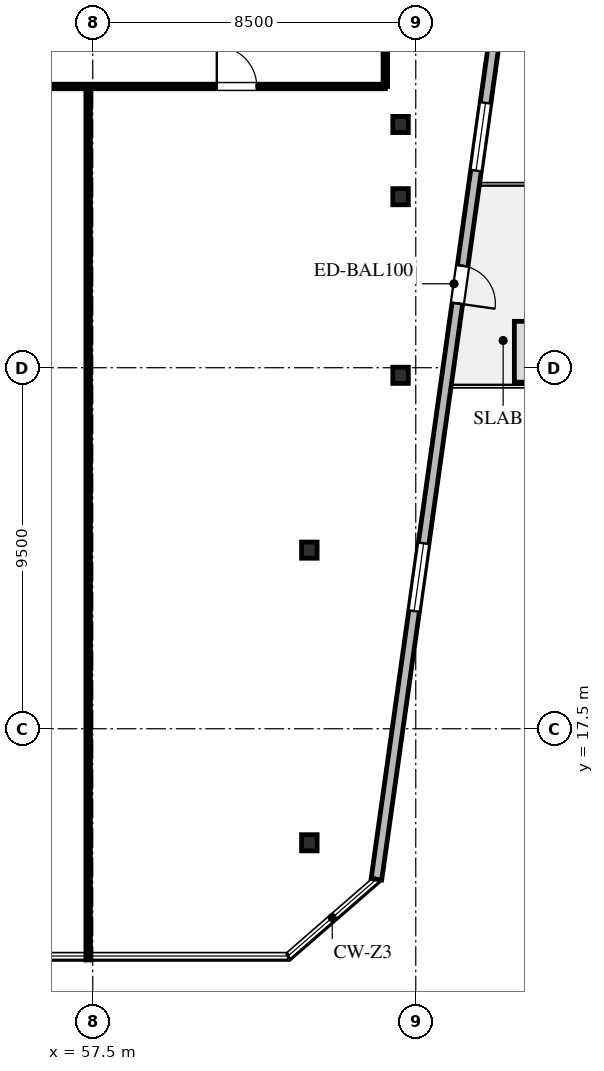
"""IFC4 building model, lengths in metres.
Left out: names, types, materials, properties, quantities, classifications, styles, units other than length and angle.
Written with IfcOpenShell. Run it as: python <this file> out.ifc"""

import sys

from ifc_helpers import new_model, si_unit, direction, frame, frame_2d, origin, origin_2d, place, context, subcontext, project, spatial, rectangle, i_section, extrude, element, fill, save


model = new_model("IFC4")
c1 = context("Model", 3, precision=1e-05, world=origin(), true_north=direction((0.0, 1.0)))
c2 = subcontext(c1, "Body", "Model", "MODEL_VIEW")
j1 = project(units=[si_unit("LENGTHUNIT", "METRE"), si_unit("PLANEANGLEUNIT", "RADIAN")], contexts=[c1])
p1 = place(None, origin())
s1 = spatial("IfcSite", under=j1, at=p1, CompositionType="ELEMENT")
p2 = place(p1, origin())
s2 = spatial("IfcBuilding", under=s1, at=p2, CompositionType="ELEMENT")
p3 = place(p2, frame((0.0, 0.0, 192.5)))
s3 = spatial("IfcBuildingStorey", under=s2, at=p3, CompositionType="ELEMENT", Elevation=192.5)
for number, where, z_axis, x_axis in (
    (1, (65.6, 26.8, 0.0), (0.0, 0.0, 1.0), (1.0, 0.0, 0.0)),
    (2, (65.6, 31.5, 0.0), (0.0, 0.0, 1.0), (1.0, 0.0, 0.0)),
    (3, (63.2, 14.5, 0.0), (0.0, 0.0, 1.0), (1.0, 0.0, 0.0)),
    (4, (63.2, 22.2, 0.0), (0.0, 0.0, 1.0), (1.0, 0.0, 0.0)),
    (5, (65.6, 33.4, 0.0), (0.0, 0.0, 1.0), (1.0, 0.0, 0.0)),
):
    element("IfcColumn", number, at=place(p3, frame(where, z_axis=z_axis, x_axis=x_axis)), inside=s3, PredefinedType="COLUMN", context=c2, shape_type="SweptSolid", body=[
        extrude(i_section(OverallWidth=0.409, OverallDepth=0.425, WebThickness=0.033, FlangeThickness=0.052, FilletRadius=0.03, at=origin_2d()), origin(), (0.0, 0.0, 1.0), 4.0),
    ])
p4 = place(p3, frame((68.375, 37.8, 0.0), z_axis=(0.0, 0.0, 1.0), x_axis=(-0.139173290738, -0.99026804207, 0.0)))
e6 = element("IfcWall", 6, at=p4, inside=s3, PredefinedType="STANDARD", context=c2, shape_type="SweptSolid", body=[
    extrude(rectangle(XDim=24.498, YDim=0.28, at=frame_2d((12.249, 0.0))), origin(), (0.0, 0.0, 1.0), 3.755),
])
p5 = place(p4, frame((8.198, 0.0, 0.0)))
e7 = element("IfcOpeningElement", 7, at=p5, cuts=e6, PredefinedType="OPENING", context=c2, shape_type="SweptSolid", body=[
    extrude(rectangle(XDim=1.0, YDim=2.15, at=frame_2d((0.5, 1.075))), frame((0.0, 0.15, 0.0), z_axis=(0.0, -1.0, 0.0), x_axis=(1.0, 0.0, 0.0)), (0.0, 0.0, 1.0), 0.3),
])
p6 = place(p4, frame((3.869, 0.0, 0.65)))
e8 = element("IfcOpeningElement", 8, at=p6, cuts=e6, PredefinedType="OPENING", context=c2, shape_type="SweptSolid", body=[
    extrude(rectangle(XDim=1.8, YDim=2.1, at=frame_2d((0.9, 1.05))), frame((0.0, 0.15, 0.0), z_axis=(0.0, -1.0, 0.0), x_axis=(1.0, 0.0, 0.0)), (0.0, 0.0, 1.0), 0.3),
])
p7 = place(p4, frame((15.571, 0.0, 0.65)))
e9 = element("IfcOpeningElement", 9, at=p7, cuts=e6, PredefinedType="OPENING", context=c2, shape_type="SweptSolid", body=[
    extrude(rectangle(XDim=1.8, YDim=2.1, at=frame_2d((0.9, 1.05))), frame((0.0, 0.15, 0.0), z_axis=(0.0, -1.0, 0.0), x_axis=(1.0, 0.0, 0.0)), (0.0, 0.0, 1.0), 0.3),
])
p8 = place(p3, frame((42.2, 34.4, 0.0), z_axis=(0.0, 0.0, 1.0), x_axis=(1.0, 0.0, 0.0)))
e10 = element("IfcWall", 10, at=p8, inside=s3, PredefinedType="PARTITIONING", context=c2, shape_type="SweptSolid", body=[
    extrude(rectangle(XDim=23.0, YDim=0.12, at=frame_2d((11.5, 0.0))), origin(), (0.0, 0.0, 1.0), 2.982),
])
p9 = place(p8, frame((3.155, 0.0, 0.0)))
e11 = element("IfcOpeningElement", 11, at=p9, cuts=e10, PredefinedType="OPENING", context=c2, shape_type="SweptSolid", body=[
    extrude(rectangle(XDim=1.05, YDim=2.2, at=frame_2d((0.525, 1.1))), frame((0.0, 0.07, 0.0), z_axis=(0.0, -1.0, 0.0), x_axis=(1.0, 0.0, 0.0)), (0.0, 0.0, 1.0), 0.14),
])
p10 = place(p8, frame((10.745, 0.0, 0.0)))
e12 = element("IfcOpeningElement", 12, at=p10, cuts=e10, PredefinedType="OPENING", context=c2, shape_type="SweptSolid", body=[
    extrude(rectangle(XDim=1.05, YDim=2.2, at=frame_2d((0.525, 1.1))), frame((0.0, 0.07, 0.0), z_axis=(0.0, -1.0, 0.0), x_axis=(1.0, 0.0, 0.0)), (0.0, 0.0, 1.0), 0.14),
])
p11 = place(p8, frame((18.565, 0.0, 0.0)))
e13 = element("IfcOpeningElement", 13, at=p11, cuts=e10, PredefinedType="OPENING", context=c2, shape_type="SweptSolid", body=[
    extrude(rectangle(XDim=1.05, YDim=2.2, at=frame_2d((0.525, 1.1))), frame((0.0, 0.07, 0.0), z_axis=(0.0, -1.0, 0.0), x_axis=(1.0, 0.0, 0.0)), (0.0, 0.0, 1.0), 0.14),
])
p12 = place(p3, frame((65.2, 34.4, 0.0), z_axis=(0.0, 0.0, 1.0), x_axis=(0.0, 1.0, 0.0)))
e14 = element("IfcWall", 14, at=p12, inside=s3, PredefinedType="PARTITIONING", context=c2, shape_type="SweptSolid", body=[
    extrude(rectangle(XDim=3.317, YDim=0.12, at=frame_2d((1.659, 0.0))), origin(), (0.0, 0.0, 1.0), 2.982),
])
p13 = place(p3, frame((57.38, 11.415, 0.0), z_axis=(0.0, 0.0, 1.0), x_axis=(0.0, 1.0, 0.0)))
e15 = element("IfcWall", 15, at=p13, inside=s3, PredefinedType="PARTITIONING", context=c2, shape_type="SweptSolid", body=[
    extrude(rectangle(XDim=22.917, YDim=0.12, at=frame_2d((11.458, 0.0))), origin(), (0.0, 0.0, 1.0), 2.982),
])
p14 = place(p5, origin())
e16 = element("IfcDoor", 16, at=p14, inside=s3, OperationType="SINGLE_SWING_RIGHT", PredefinedType="DOOR", context=c2, shape_type="SweptSolid", body=[
    extrude(rectangle(XDim=1.0, YDim=2.15, at=frame_2d((0.5, 1.075))), frame((0.0, 0.025, 0.0), z_axis=(0.0, -1.0, 0.0), x_axis=(1.0, 0.0, 0.0)), (0.0, 0.0, 1.0), 0.05),
])
fill(e7, e16)
p15 = place(p6, origin())
e17 = element("IfcWindow", 17, at=p15, inside=s3, PartitioningType="SINGLE_PANEL", PredefinedType="WINDOW", context=c2, shape_type="SweptSolid", body=[
    extrude(rectangle(XDim=1.8, YDim=2.1, at=frame_2d((0.9, 1.05))), frame((0.0, 0.03, 0.0), z_axis=(0.0, -1.0, 0.0), x_axis=(1.0, 0.0, 0.0)), (0.0, 0.0, 1.0), 0.06),
])
fill(e8, e17)
p16 = place(p7, origin())
e18 = element("IfcWindow", 18, at=p16, inside=s3, PartitioningType="SINGLE_PANEL", PredefinedType="WINDOW", context=c2, shape_type="SweptSolid", body=[
    extrude(rectangle(XDim=1.8, YDim=2.1, at=frame_2d((0.9, 1.05))), frame((0.0, 0.03, 0.0), z_axis=(0.0, -1.0, 0.0), x_axis=(1.0, 0.0, 0.0)), (0.0, 0.0, 1.0), 0.06),
])
fill(e9, e18)
p17 = place(p11, origin())
e19 = element("IfcDoor", 19, at=p17, inside=s3, OperationType="SINGLE_SWING_LEFT", PredefinedType="DOOR", context=c2, shape_type="SweptSolid", body=[
    extrude(rectangle(XDim=1.05, YDim=2.2, at=frame_2d((0.525, 1.1))), frame((0.0, 0.025, 0.0), z_axis=(0.0, -1.0, 0.0), x_axis=(1.0, 0.0, 0.0)), (0.0, 0.0, 1.0), 0.05),
])
fill(e13, e19)
save(model, sys.argv[1])
